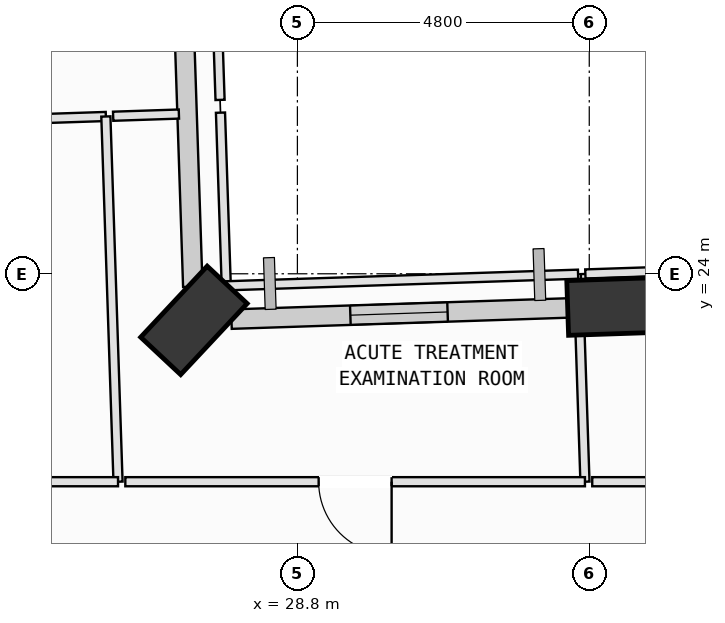
"""IFC4 building model, lengths in metres.
Left out: names, types, materials, properties, quantities, classifications, styles, units other than length and angle.
Written with IfcOpenShell. Run it as: python <this file> out.ifc"""

import sys

from ifc_helpers import new_model, si_unit, direction, frame, frame_2d, origin, origin_2d, place, context, subcontext, project, spatial, rectangle, extrude, element, fill, save


model = new_model("IFC4")
c1 = context("Model", 3, precision=1e-05, world=origin(), true_north=direction((0.0, 1.0)))
c2 = subcontext(c1, "Body", "Model", "MODEL_VIEW")
j1 = project(units=[si_unit("LENGTHUNIT", "METRE"), si_unit("PLANEANGLEUNIT", "RADIAN")], contexts=[c1])
p1 = place(None, origin())
s1 = spatial("IfcSite", under=j1, at=p1, CompositionType="ELEMENT")
p2 = place(p1, origin())
s2 = spatial("IfcBuilding", under=s1, at=p2, CompositionType="ELEMENT")
p3 = place(p2, frame((0.0, 0.0, 31.0)))
s3 = spatial("IfcBuildingStorey", under=s2, at=p3, CompositionType="ELEMENT", Elevation=31.0)
p4 = place(p3, frame((34.044, 23.464, 0.002), z_axis=(0.005558854074, 0.001832589255, 0.999982870232), x_axis=(-0.344410613916, 0.938819094055, 0.000194061884)))
e1 = element("IfcColumn", 1, at=p4, inside=s3, PredefinedType="COLUMN", context=c2, shape_type="SweptSolid", body=[
    extrude(rectangle(XDim=1.6, YDim=0.9, at=origin_2d()), origin(), (0.0, 0.0, 1.0), 3.997),
])
p5 = place(p3, frame((27.098, 23.234, 0.002), z_axis=(0.006717020494, -0.026929145799, 0.999614777173), x_axis=(0.486316991938, 0.873547428261, 0.020265091433)))
e2 = element("IfcColumn", 2, at=p5, inside=s3, PredefinedType="COLUMN", context=c2, shape_type="SweptSolid", body=[
    extrude(rectangle(XDim=1.6, YDim=0.9, at=origin_2d()), origin(), (0.0, 0.0, 1.0), 3.998),
])
p6 = place(p3, frame((27.715, 23.254, 0.0), z_axis=(0.0, 0.0, 1.0), x_axis=(0.999450231938, 0.033154696192, 0.0)))
e3 = element("IfcWall", 3, at=p6, inside=s3, PredefinedType="SOLIDWALL", context=c2, shape_type="SweptSolid", body=[
    extrude(rectangle(XDim=5.736, YDim=0.32, at=frame_2d((2.868, 0.0))), origin(), (0.0, 0.0, 1.0), 3.165),
])
p7 = place(p6, frame((1.957, 0.0, 0.75)))
e4 = element("IfcOpeningElement", 4, at=p7, cuts=e3, PredefinedType="OPENING", context=c2, shape_type="SweptSolid", body=[
    extrude(rectangle(XDim=1.6, YDim=1.95, at=frame_2d((0.8, 0.975))), frame((0.0, 0.17, 0.0), z_axis=(0.0, -1.0, 0.0), x_axis=(1.0, 0.0, 0.0)), (0.0, 0.0, 1.0), 0.34),
])
p8 = place(p3, frame((27.08, 23.787, 0.0), z_axis=(0.0, 0.0, 1.0), x_axis=(-0.033169315514, 0.999449746865, 0.0)))
e5 = element("IfcWall", 5, at=p8, inside=s3, PredefinedType="SOLIDWALL", context=c2, shape_type="SweptSolid", body=[
    extrude(rectangle(XDim=6.536, YDim=0.32, at=frame_2d((3.268, 0.0))), origin(), (0.0, 0.0, 1.0), 3.165),
])
p9 = place(p3, frame((18.55, 26.352, 0.0), z_axis=(0.0, 0.0, 1.0), x_axis=(0.999453304849, 0.033061933196, 0.0)))
e6 = element("IfcWall", 6, at=p9, inside=s3, PredefinedType="PARTITIONING", context=c2, shape_type="SweptSolid", body=[
    extrude(rectangle(XDim=7.104, YDim=0.15, at=frame_2d((3.552, 0.0))), origin(), (0.0, 0.0, 1.0), 3.78),
])
p10 = place(p3, frame((25.65, 26.587, 0.0), z_axis=(0.0, 0.0, 1.0), x_axis=(0.033309420078, -0.999445087303, 0.0)))
e7 = element("IfcWall", 7, at=p10, inside=s3, PredefinedType="PARTITIONING", context=c2, shape_type="SweptSolid", body=[
    extrude(rectangle(XDim=6.01, YDim=0.15, at=frame_2d((3.005, 0.0))), origin(), (0.0, 0.0, 1.0), 3.78),
])
p11 = place(p3, frame((25.85, 20.58, 0.0), z_axis=(0.0, 0.0, 1.0), x_axis=(-1.0, 0.0, 0.0)))
e8 = element("IfcWall", 8, at=p11, inside=s3, PredefinedType="PARTITIONING", context=c2, shape_type="SweptSolid", body=[
    extrude(rectangle(XDim=7.108, YDim=0.15, at=frame_2d((3.554, 0.0))), origin(), (0.0, 0.0, 1.0), 3.78),
])
p12 = place(p11, frame((2.954, 0.0, 0.0)))
e9 = element("IfcOpeningElement", 9, at=p12, cuts=e8, PredefinedType="OPENING", context=c2, shape_type="SweptSolid", body=[
    extrude(rectangle(XDim=1.2, YDim=2.15, at=frame_2d((0.6, 1.075))), frame((0.0, 0.085, 0.0), z_axis=(0.0, -1.0, 0.0), x_axis=(1.0, 0.0, 0.0)), (0.0, 0.0, 1.0), 0.17),
])
p13 = place(p3, frame((25.77, 26.591, 0.0), z_axis=(0.0, 0.0, 1.0), x_axis=(0.999449407039, 0.033179553486, 0.0)))
e10 = element("IfcWall", 10, at=p13, inside=s3, PredefinedType="PARTITIONING", context=c2, shape_type="SweptSolid", body=[
    extrude(rectangle(XDim=1.082, YDim=0.15, at=frame_2d((0.541, 0.0))), origin(), (0.0, 0.0, 1.0), 3.78),
])
p14 = place(p3, frame((27.535, 26.65, 0.0), z_axis=(0.0, 0.0, 1.0), x_axis=(0.033329094198, -0.999444431412, 0.0)))
e11 = element("IfcWall", 11, at=p14, inside=s3, PredefinedType="PARTITIONING", context=c2, shape_type="SweptSolid", body=[
    extrude(rectangle(XDim=2.849, YDim=0.15, at=frame_2d((1.425, 0.0))), origin(), (0.0, 0.0, 1.0), 3.78),
])
p15 = place(p3, frame((27.63, 23.802, 0.0), z_axis=(0.0, 0.0, 1.0), x_axis=(0.999456083322, 0.032977833635, 0.0)))
e12 = element("IfcWall", 12, at=p15, inside=s3, PredefinedType="PARTITIONING", context=c2, shape_type="SweptSolid", body=[
    extrude(rectangle(XDim=5.789, YDim=0.15, at=frame_2d((2.895, 0.0))), origin(), (0.0, 0.0, 1.0), 3.78),
])
p16 = place(p3, frame((33.439, 23.309, 0.0), z_axis=(0.0, 0.0, 1.0), x_axis=(0.03299329991, -0.99945557288, 0.0)))
e13 = element("IfcWall", 13, at=p16, inside=s3, PredefinedType="PARTITIONING", context=c2, shape_type="SweptSolid", body=[
    extrude(rectangle(XDim=2.73, YDim=0.15, at=frame_2d((1.365, 0.0))), origin(), (0.0, 0.0, 1.0), 3.78),
])
p17 = place(p3, frame((33.529, 20.58, 0.0), z_axis=(0.0, 0.0, 1.0), x_axis=(-1.0, 0.0, 0.0)))
e14 = element("IfcWall", 14, at=p17, inside=s3, PredefinedType="PARTITIONING", context=c2, shape_type="SweptSolid", body=[
    extrude(rectangle(XDim=7.559, YDim=0.15, at=frame_2d((3.78, 0.0))), origin(), (0.0, 0.0, 1.0), 3.78),
])
p18 = place(p17, frame((3.179, 0.0, 0.0)))
e15 = element("IfcOpeningElement", 15, at=p18, cuts=e14, PredefinedType="OPENING", context=c2, shape_type="SweptSolid", body=[
    extrude(rectangle(XDim=1.2, YDim=2.15, at=frame_2d((0.6, 1.075))), frame((0.0, 0.085, 0.0), z_axis=(0.0, -1.0, 0.0), x_axis=(1.0, 0.0, 0.0)), (0.0, 0.0, 1.0), 0.17),
])
p19 = place(p3, frame((38.0, 20.58, 0.0), z_axis=(0.0, 0.0, 1.0), x_axis=(-1.0, 0.0, 0.0)))
e16 = element("IfcWall", 16, at=p19, inside=s3, PredefinedType="PARTITIONING", context=c2, shape_type="SweptSolid", body=[
    extrude(rectangle(XDim=4.351, YDim=0.15, at=frame_2d((2.176, 0.0))), origin(), (0.0, 0.0, 1.0), 3.365),
])
p20 = place(p19, frame((1.575, 0.0, 0.0)))
e17 = element("IfcOpeningElement", 17, at=p20, cuts=e16, PredefinedType="OPENING", context=c2, shape_type="SweptSolid", body=[
    extrude(rectangle(XDim=1.2, YDim=2.15, at=frame_2d((0.6, 1.075))), frame((0.0, 0.085, 0.0), z_axis=(0.0, -1.0, 0.0), x_axis=(1.0, 0.0, 0.0)), (0.0, 0.0, 1.0), 0.17),
])
p21 = place(p3, frame((33.551, 23.531, 0.0), z_axis=(0.0, 0.0, 1.0), x_axis=(-0.03246062176, 0.999473015161, 0.0)))
e18 = element("IfcWall", 18, at=p21, inside=s3, PredefinedType="PARTITIONING", context=c2, shape_type="SweptSolid", body=[
    extrude(rectangle(XDim=0.466, YDim=0.15, at=frame_2d((0.233, 0.0))), origin(), (0.0, 0.0, 1.0), 3.78),
])
p22 = place(p3, frame((33.536, 23.997, 0.0), z_axis=(0.0, 0.0, 1.0), x_axis=(0.999448094367, 0.033219070808, 0.0)))
e19 = element("IfcWall", 19, at=p22, inside=s3, PredefinedType="PARTITIONING", context=c2, shape_type="SweptSolid", body=[
    extrude(rectangle(XDim=7.555, YDim=0.15, at=frame_2d((3.778, 0.0))), origin(), (0.0, 0.0, 1.0), 3.78),
])
p23 = place(p3, frame((27.205, 36.604, 0.0), z_axis=(0.0, 0.0, 1.0), x_axis=(0.033130558388, -0.999451032368, 0.0)))
e20 = element("IfcWall", 20, at=p23, inside=s3, PredefinedType="PARTITIONING", context=c2, shape_type="SweptSolid", body=[
    extrude(rectangle(XDim=9.749, YDim=0.15, at=frame_2d((4.875, 0.0))), origin(), (0.0, 0.0, 1.0), 3.78),
])
p24 = place(p7, origin())
e21 = element("IfcWindow", 21, at=p24, inside=s3, PartitioningType="SINGLE_PANEL", PredefinedType="WINDOW", context=c2, shape_type="SweptSolid", body=[
    extrude(rectangle(XDim=1.6, YDim=1.95, at=frame_2d((0.8, 0.975))), frame((0.0, 0.03, 0.0), z_axis=(0.0, -1.0, 0.0), x_axis=(1.0, 0.0, 0.0)), (0.0, 0.0, 1.0), 0.06),
])
fill(e4, e21)
p25 = place(p18, origin())
e22 = element("IfcDoor", 22, at=p25, inside=s3, OperationType="SINGLE_SWING_LEFT", PredefinedType="DOOR", context=c2, shape_type="SweptSolid", body=[
    extrude(rectangle(XDim=1.2, YDim=2.15, at=frame_2d((0.6, 1.075))), frame((0.0, 0.025, 0.0), z_axis=(0.0, -1.0, 0.0), x_axis=(1.0, 0.0, 0.0)), (0.0, 0.0, 1.0), 0.05),
])
fill(e15, e22)
save(model, sys.argv[1])
